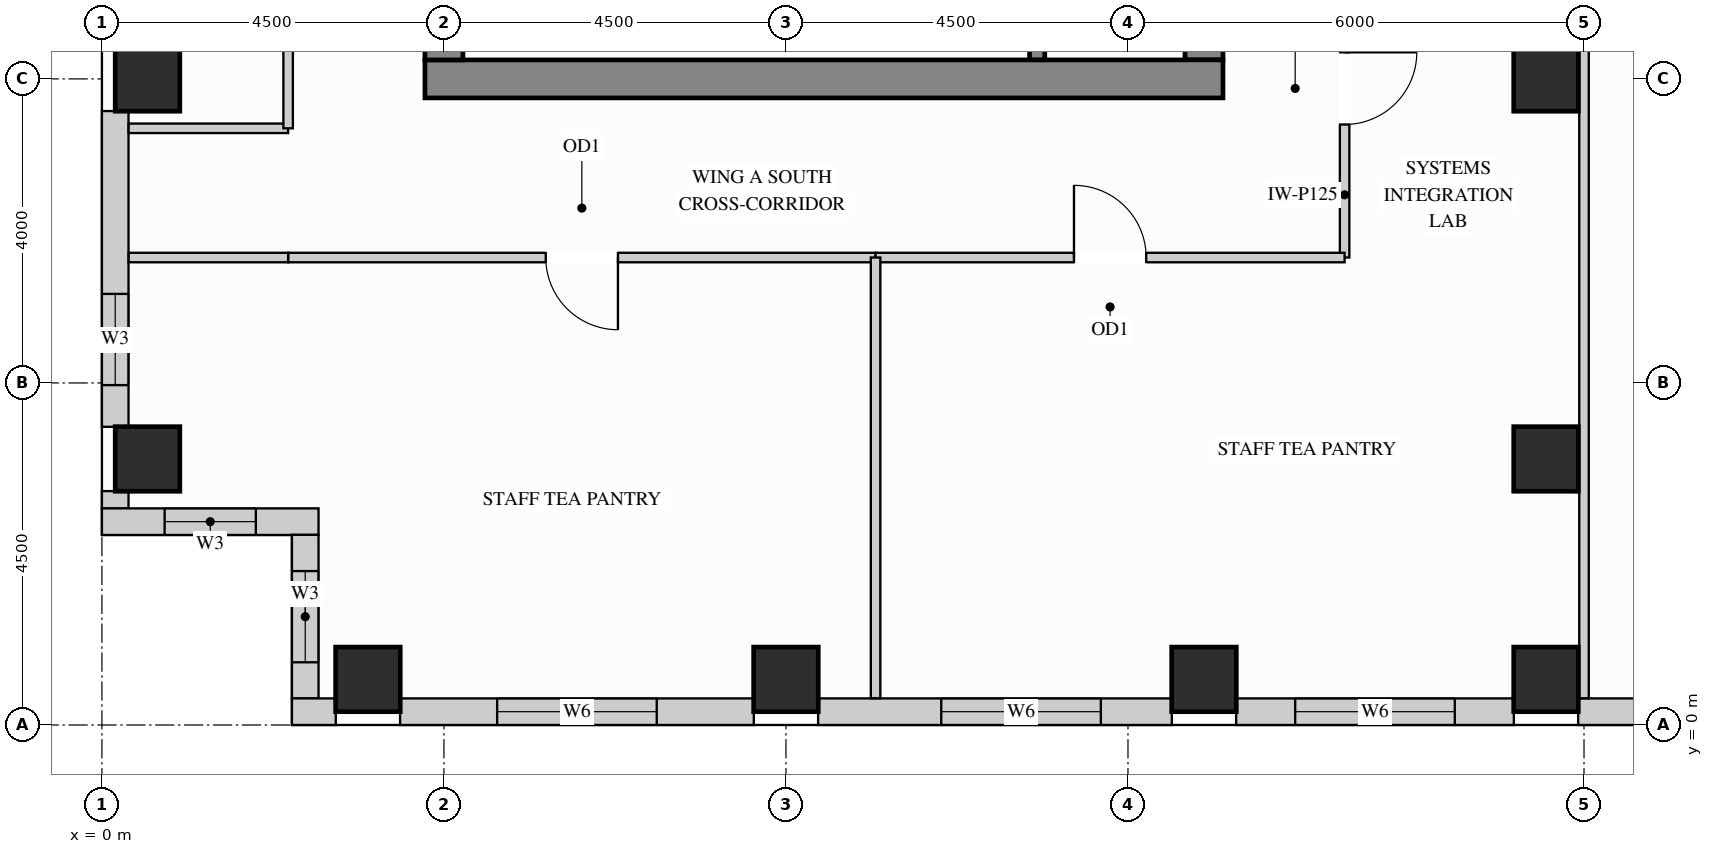
"""IFC4 building model, lengths in metres.
Left out: names, types, materials, properties, quantities, classifications, styles, units other than length and angle.
Written with IfcOpenShell. Run it as: python <this file> out.ifc"""

import sys

from ifc_helpers import new_model, si_unit, direction, frame, frame_2d, origin, origin_2d, place, context, subcontext, project, spatial, rectangle, extrude, source, transform, mapped, element, fill, save


model = new_model("IFC4")
c1 = context("Model", 3, precision=1e-05, world=origin(), true_north=direction((0.0, 1.0)))
c2 = subcontext(c1, "Body", "Model", "MODEL_VIEW")
j1 = project(units=[si_unit("LENGTHUNIT", "METRE"), si_unit("PLANEANGLEUNIT", "RADIAN")], contexts=[c1])
p1 = place(None, origin())
s1 = spatial("IfcSite", under=j1, at=p1, CompositionType="ELEMENT")
p2 = place(p1, origin())
s2 = spatial("IfcBuilding", under=s1, at=p2, CompositionType="ELEMENT")
p3 = place(p2, frame((0.0, 0.0, 273.6)))
s3 = spatial("IfcBuildingStorey", under=s2, at=p3, CompositionType="ELEMENT", Elevation=273.6)
m1 = source(origin(), c2, "Body", "SweptSolid", [
    extrude(rectangle(XDim=0.85, YDim=0.85, at=origin_2d()), origin(), (0.0, 0.0, 1.0), 3.37),
])
for number, where, z_axis, x_axis in (
    (1, (19.0, 3.5, 0.0), (0.0, 0.0, 1.0), (1.0, 0.0, 0.0)),
    (2, (19.0, 8.5, 0.0), (0.0, 0.0, 1.0), (1.0, 0.0, 0.0)),
    (3, (14.5, 0.6, 0.0), (0.0, 0.0, 1.0), (1.0, 0.0, 0.0)),
    (4, (19.0, 0.6, 0.0), (0.0, 0.0, 1.0), (1.0, 0.0, 0.0)),
    (5, (3.5, 0.6, 0.0), (0.0, 0.0, 1.0), (1.0, 0.0, 0.0)),
    (6, (9.0, 0.6, 0.0), (0.0, 0.0, 1.0), (1.0, 0.0, 0.0)),
    (7, (0.6, 3.5, 0.0), (0.0, 0.0, 1.0), (1.0, 0.0, 0.0)),
    (8, (0.6, 8.5, 0.0), (0.0, 0.0, 1.0), (1.0, 0.0, 0.0)),
):
    element("IfcColumn", number, at=place(p3, frame(where, z_axis=z_axis, x_axis=x_axis)), inside=s3, PredefinedType="COLUMN", context=c2, shape_type="MappedRepresentation", body=[
        mapped(m1, transform((0.0, 0.0, 0.0), x_axis=(1.0, 0.0, 0.0), y_axis=(0.0, 1.0, 0.0), z_axis=(0.0, 0.0, 1.0))),
    ])
m2 = source(origin(), c2, "Body", "SweptSolid", [
    extrude(rectangle(XDim=10.07, YDim=0.5, at=frame_2d((5.035, 0.0))), origin(), (0.0, 0.0, 1.0), 3.37),
])
p4 = place(p3, frame((14.5, 8.75, 0.0), z_axis=(0.0, 0.0, 1.0), x_axis=(0.0, 1.0, 0.0)))
e9 = element("IfcWall", 9, at=p4, inside=s3, PredefinedType="SHEAR", context=c2, shape_type="MappedRepresentation", body=[
    mapped(m2, transform((0.0, 0.0, 0.0), x_axis=(1.0, 0.0, 0.0), y_axis=(0.0, 1.0, 0.0), z_axis=(0.0, 0.0, 1.0))),
])
m3 = source(origin(), c2, "Body", "SweptSolid", [
    extrude(rectangle(XDim=10.5, YDim=0.5, at=frame_2d((5.25, 0.0))), origin(), (0.0, 0.0, 1.0), 3.37),
])
p5 = place(p3, frame((4.25, 8.5, 0.0), z_axis=(0.0, 0.0, 1.0), x_axis=(1.0, 0.0, 0.0)))
e10 = element("IfcWall", 10, at=p5, inside=s3, PredefinedType="SHEAR", context=c2, shape_type="MappedRepresentation", body=[
    mapped(m3, transform((0.0, 0.0, 0.0), x_axis=(1.0, 0.0, 0.0), y_axis=(0.0, 1.0, 0.0), z_axis=(0.0, 0.0, 1.0))),
])
m4 = source(origin(), c2, "Body", "SweptSolid", [
    extrude(rectangle(XDim=20.5, YDim=0.5, at=frame_2d((10.25, 0.0))), origin(), (0.0, 0.0, 1.0), 3.37),
])
p6 = place(p3, frame((4.5, 8.75, 0.0), z_axis=(0.0, 0.0, 1.0), x_axis=(0.0, 1.0, 0.0)))
e11 = element("IfcWall", 11, at=p6, inside=s3, PredefinedType="SHEAR", context=c2, shape_type="MappedRepresentation", body=[
    mapped(m4, transform((0.0, 0.0, 0.0), x_axis=(1.0, 0.0, 0.0), y_axis=(0.0, 1.0, 0.0), z_axis=(0.0, 0.0, 1.0))),
])
p7 = place(p3, frame((0.175, 8.077, 0.0), z_axis=(0.0, 0.0, 1.0), x_axis=(0.0, -1.0, 0.0)))
e12 = element("IfcWall", 12, at=p7, inside=s3, PredefinedType="SOLIDWALL", context=c2, shape_type="SweptSolid", body=[
    extrude(rectangle(XDim=4.154, YDim=0.35, at=frame_2d((2.077, 0.0))), origin(), (0.0, 0.0, 1.0), 3.355),
])
p8 = place(p7, frame((2.406, 0.0, 0.78)))
e13 = element("IfcOpeningElement", 13, at=p8, cuts=e12, PredefinedType="OPENING", context=c2, shape_type="SweptSolid", body=[
    extrude(rectangle(XDim=1.2, YDim=2.25, at=frame_2d((0.6, 1.125))), frame((0.0, 0.185, 0.0), z_axis=(0.0, -1.0, 0.0), x_axis=(1.0, 0.0, 0.0)), (0.0, 0.0, 1.0), 0.37),
])
m5 = source(origin(), c2, "Body", "SweptSolid", [
    extrude(rectangle(XDim=0.229, YDim=0.35, at=frame_2d((0.115, 0.0))), origin(), (0.0, 0.0, 1.0), 3.355),
])
p9 = place(p3, frame((0.175, 3.077, 0.0), z_axis=(0.0, 0.0, 1.0), x_axis=(0.0, -1.0, 0.0)))
e14 = element("IfcWall", 14, at=p9, inside=s3, PredefinedType="SOLIDWALL", context=c2, shape_type="MappedRepresentation", body=[
    mapped(m5, transform((0.0, 0.0, 0.0), x_axis=(1.0, 0.0, 0.0), y_axis=(0.0, 1.0, 0.0), z_axis=(0.0, 0.0, 1.0))),
])
p10 = place(p3, frame((0.0, 2.675, 0.0), z_axis=(0.0, 0.0, 1.0), x_axis=(1.0, 0.0, 0.0)))
e15 = element("IfcWall", 15, at=p10, inside=s3, PredefinedType="SOLIDWALL", context=c2, shape_type="SweptSolid", body=[
    extrude(rectangle(XDim=2.85, YDim=0.35, at=frame_2d((1.425, 0.0))), origin(), (0.0, 0.0, 1.0), 3.355),
])
p11 = place(p10, frame((0.825, 0.0, 0.78)))
e16 = element("IfcOpeningElement", 16, at=p11, cuts=e15, PredefinedType="OPENING", context=c2, shape_type="SweptSolid", body=[
    extrude(rectangle(XDim=1.2, YDim=2.25, at=frame_2d((0.6, 1.125))), frame((0.0, 0.185, 0.0), z_axis=(0.0, -1.0, 0.0), x_axis=(1.0, 0.0, 0.0)), (0.0, 0.0, 1.0), 0.37),
])
p12 = place(p3, frame((2.675, 2.502, 0.0), z_axis=(0.0, 0.0, 1.0), x_axis=(0.0, -1.0, 0.0)))
e17 = element("IfcWall", 17, at=p12, inside=s3, PredefinedType="SOLIDWALL", context=c2, shape_type="SweptSolid", body=[
    extrude(rectangle(XDim=2.154, YDim=0.35, at=frame_2d((1.077, 0.0))), origin(), (0.0, 0.0, 1.0), 3.355),
])
p13 = place(p12, frame((0.477, 0.0, 0.78)))
e18 = element("IfcOpeningElement", 18, at=p13, cuts=e17, PredefinedType="OPENING", context=c2, shape_type="SweptSolid", body=[
    extrude(rectangle(XDim=1.2, YDim=2.25, at=frame_2d((0.6, 1.125))), frame((0.0, 0.185, 0.0), z_axis=(0.0, -1.0, 0.0), x_axis=(1.0, 0.0, 0.0)), (0.0, 0.0, 1.0), 0.37),
])
m6 = source(origin(), c2, "Body", "SweptSolid", [
    extrude(rectangle(XDim=0.577, YDim=0.35, at=frame_2d((0.289, 0.0))), origin(), (0.0, 0.0, 1.0), 3.355),
])
p14 = place(p3, frame((2.5, 0.175, 0.0), z_axis=(0.0, 0.0, 1.0), x_axis=(1.0, 0.0, 0.0)))
e19 = element("IfcWall", 19, at=p14, inside=s3, PredefinedType="SOLIDWALL", context=c2, shape_type="MappedRepresentation", body=[
    mapped(m6, transform((0.0, 0.0, 0.0), x_axis=(1.0, 0.0, 0.0), y_axis=(0.0, 1.0, 0.0), z_axis=(0.0, 0.0, 1.0))),
])
p15 = place(p3, frame((3.923, 0.175, 0.0), z_axis=(0.0, 0.0, 1.0), x_axis=(1.0, 0.0, 0.0)))
e20 = element("IfcWall", 20, at=p15, inside=s3, PredefinedType="SOLIDWALL", context=c2, shape_type="SweptSolid", body=[
    extrude(rectangle(XDim=4.654, YDim=0.35, at=frame_2d((2.327, 0.0))), origin(), (0.0, 0.0, 1.0), 3.355),
])
p16 = place(p15, frame((1.277, 0.0, 0.78)))
e21 = element("IfcOpeningElement", 21, at=p16, cuts=e20, PredefinedType="OPENING", context=c2, shape_type="SweptSolid", body=[
    extrude(rectangle(XDim=2.1, YDim=2.25, at=frame_2d((1.05, 1.125))), frame((0.0, 0.185, 0.0), z_axis=(0.0, -1.0, 0.0), x_axis=(1.0, 0.0, 0.0)), (0.0, 0.0, 1.0), 0.37),
])
p17 = place(p3, frame((9.423, 0.175, 0.0), z_axis=(0.0, 0.0, 1.0), x_axis=(1.0, 0.0, 0.0)))
e22 = element("IfcWall", 22, at=p17, inside=s3, PredefinedType="SOLIDWALL", context=c2, shape_type="SweptSolid", body=[
    extrude(rectangle(XDim=4.654, YDim=0.35, at=frame_2d((2.327, 0.0))), origin(), (0.0, 0.0, 1.0), 3.355),
])
p18 = place(p17, frame((1.62, 0.0, 0.78)))
e23 = element("IfcOpeningElement", 23, at=p18, cuts=e22, PredefinedType="OPENING", context=c2, shape_type="SweptSolid", body=[
    extrude(rectangle(XDim=2.1, YDim=2.25, at=frame_2d((1.05, 1.125))), frame((0.0, 0.185, 0.0), z_axis=(0.0, -1.0, 0.0), x_axis=(1.0, 0.0, 0.0)), (0.0, 0.0, 1.0), 0.37),
])
p19 = place(p3, frame((14.923, 0.175, 0.0), z_axis=(0.0, 0.0, 1.0), x_axis=(1.0, 0.0, 0.0)))
e24 = element("IfcWall", 24, at=p19, inside=s3, PredefinedType="SOLIDWALL", context=c2, shape_type="SweptSolid", body=[
    extrude(rectangle(XDim=3.654, YDim=0.35, at=frame_2d((1.827, 0.0))), origin(), (0.0, 0.0, 1.0), 3.355),
])
p20 = place(p19, frame((0.777, 0.0, 0.78)))
e25 = element("IfcOpeningElement", 25, at=p20, cuts=e24, PredefinedType="OPENING", context=c2, shape_type="SweptSolid", body=[
    extrude(rectangle(XDim=2.1, YDim=2.25, at=frame_2d((1.05, 1.125))), frame((0.0, 0.185, 0.0), z_axis=(0.0, -1.0, 0.0), x_axis=(1.0, 0.0, 0.0)), (0.0, 0.0, 1.0), 0.37),
])
p21 = place(p3, frame((19.423, 0.175, 0.0), z_axis=(0.0, 0.0, 1.0), x_axis=(1.0, 0.0, 0.0)))
e26 = element("IfcWall", 26, at=p21, inside=s3, PredefinedType="SOLIDWALL", context=c2, shape_type="SweptSolid", body=[
    extrude(rectangle(XDim=3.554, YDim=0.35, at=frame_2d((1.777, 0.0))), origin(), (0.0, 0.0, 1.0), 3.355),
])
p22 = place(p21, frame((1.031, 0.0, 0.78)))
e27 = element("IfcOpeningElement", 27, at=p22, cuts=e26, PredefinedType="OPENING", context=c2, shape_type="SweptSolid", body=[
    extrude(rectangle(XDim=1.5, YDim=2.0, at=frame_2d((0.75, 1.0))), frame((0.0, 0.185, 0.0), z_axis=(0.0, -1.0, 0.0), x_axis=(1.0, 0.0, 0.0)), (0.0, 0.0, 1.0), 0.37),
])
p23 = place(p3, frame((16.35, 6.15, 0.0), z_axis=(0.0, 0.0, 1.0), x_axis=(0.0, 1.0, 0.0)))
e28 = element("IfcWall", 28, at=p23, inside=s3, PredefinedType="PARTITIONING", context=c2, shape_type="SweptSolid", body=[
    extrude(rectangle(XDim=4.45, YDim=0.125, at=frame_2d((2.225, 0.0))), origin(), (0.0, 0.0, 1.0), 3.355),
])
p24 = place(p23, frame((1.75, 0.0, 0.0)))
e29 = element("IfcOpeningElement", 29, at=p24, cuts=e28, PredefinedType="OPENING", context=c2, shape_type="SweptSolid", body=[
    extrude(rectangle(XDim=0.95, YDim=2.15, at=frame_2d((0.475, 1.075))), frame((0.0, 0.073, 0.0), z_axis=(0.0, -1.0, 0.0), x_axis=(1.0, 0.0, 0.0)), (0.0, 0.0, 1.0), 0.145),
])
m7 = source(origin(), c2, "Body", "SweptSolid", [
    extrude(rectangle(XDim=2.098, YDim=0.125, at=frame_2d((1.049, 0.0))), origin(), (0.0, 0.0, 1.0), 3.355),
])
p25 = place(p3, frame((0.352, 7.85, 0.0), z_axis=(0.0, 0.0, 1.0), x_axis=(1.0, 0.0, 0.0)))
e30 = element("IfcWall", 30, at=p25, inside=s3, PredefinedType="PARTITIONING", context=c2, shape_type="MappedRepresentation", body=[
    mapped(m7, transform((0.0, 0.0, 0.0), x_axis=(1.0, 0.0, 0.0), y_axis=(0.0, 1.0, 0.0), z_axis=(0.0, 0.0, 1.0))),
])
m8 = source(origin(), c2, "Body", "SweptSolid", [
    extrude(rectangle(XDim=10.248, YDim=0.125, at=frame_2d((5.124, 0.0))), origin(), (0.0, 0.0, 1.0), 3.355),
])
p26 = place(p3, frame((19.5, 0.352, 0.0), z_axis=(0.0, 0.0, 1.0), x_axis=(0.0, 1.0, 0.0)))
e31 = element("IfcWall", 31, at=p26, inside=s3, PredefinedType="PARTITIONING", context=c2, shape_type="MappedRepresentation", body=[
    mapped(m8, transform((0.0, 0.0, 0.0), x_axis=(1.0, 0.0, 0.0), y_axis=(0.0, 1.0, 0.0), z_axis=(0.0, 0.0, 1.0))),
])
p27 = place(p3, frame((2.45, 6.15, 0.0), z_axis=(0.0, 0.0, 1.0), x_axis=(1.0, 0.0, 0.0)))
e32 = element("IfcWall", 32, at=p27, inside=s3, PredefinedType="PARTITIONING", context=c2, shape_type="SweptSolid", body=[
    extrude(rectangle(XDim=7.729, YDim=0.125, at=frame_2d((3.865, 0.0))), origin(), (0.0, 0.0, 1.0), 3.355),
])
p28 = place(p27, frame((3.389, 0.0, 0.0)))
e33 = element("IfcOpeningElement", 33, at=p28, cuts=e32, PredefinedType="OPENING", context=c2, shape_type="SweptSolid", body=[
    extrude(rectangle(XDim=0.95, YDim=2.15, at=frame_2d((0.475, 1.075))), frame((0.0, 0.073, 0.0), z_axis=(0.0, -1.0, 0.0), x_axis=(1.0, 0.0, 0.0)), (0.0, 0.0, 1.0), 0.145),
])
p29 = place(p3, frame((10.179, 6.15, 0.0), z_axis=(0.0, 0.0, 1.0), x_axis=(1.0, 0.0, 0.0)))
e34 = element("IfcWall", 34, at=p29, inside=s3, PredefinedType="PARTITIONING", context=c2, shape_type="SweptSolid", body=[
    extrude(rectangle(XDim=6.171, YDim=0.125, at=frame_2d((3.085, 0.0))), origin(), (0.0, 0.0, 1.0), 3.355),
])
p30 = place(p29, frame((2.611, 0.0, 0.0)))
e35 = element("IfcOpeningElement", 35, at=p30, cuts=e34, PredefinedType="OPENING", context=c2, shape_type="SweptSolid", body=[
    extrude(rectangle(XDim=0.95, YDim=2.15, at=frame_2d((0.475, 1.075))), frame((0.0, 0.073, 0.0), z_axis=(0.0, -1.0, 0.0), x_axis=(1.0, 0.0, 0.0)), (0.0, 0.0, 1.0), 0.145),
])
p31 = place(p3, frame((0.352, 6.15, 0.0), z_axis=(0.0, 0.0, 1.0), x_axis=(1.0, 0.0, 0.0)))
e36 = element("IfcWall", 36, at=p31, inside=s3, PredefinedType="PARTITIONING", context=c2, shape_type="MappedRepresentation", body=[
    mapped(m7, transform((0.0, 0.0, 0.0), x_axis=(1.0, 0.0, 0.0), y_axis=(0.0, 1.0, 0.0), z_axis=(0.0, 0.0, 1.0))),
])
m9 = source(origin(), c2, "Body", "SweptSolid", [
    extrude(rectangle(XDim=5.798, YDim=0.125, at=frame_2d((2.899, 0.0))), origin(), (0.0, 0.0, 1.0), 3.355),
])
p32 = place(p3, frame((10.179, 0.352, 0.0), z_axis=(0.0, 0.0, 1.0), x_axis=(0.0, 1.0, 0.0)))
e37 = element("IfcWall", 37, at=p32, inside=s3, PredefinedType="PARTITIONING", context=c2, shape_type="MappedRepresentation", body=[
    mapped(m9, transform((0.0, 0.0, 0.0), x_axis=(1.0, 0.0, 0.0), y_axis=(0.0, 1.0, 0.0), z_axis=(0.0, 0.0, 1.0))),
])
p33 = place(p3, frame((2.45, 7.85, 0.0), z_axis=(0.0, 0.0, 1.0), x_axis=(0.0, 1.0, 0.0)))
e38 = element("IfcWall", 38, at=p33, inside=s3, PredefinedType="PARTITIONING", context=c2, shape_type="SweptSolid", body=[
    extrude(rectangle(XDim=7.25, YDim=0.125, at=frame_2d((3.625, 0.0))), origin(), (0.0, 0.0, 1.0), 3.355),
])
p34 = place(p33, frame((3.15, 0.0, 0.0)))
e39 = element("IfcOpeningElement", 39, at=p34, cuts=e38, PredefinedType="OPENING", context=c2, shape_type="SweptSolid", body=[
    extrude(rectangle(XDim=0.95, YDim=2.15, at=frame_2d((0.475, 1.075))), frame((0.0, 0.073, 0.0), z_axis=(0.0, -1.0, 0.0), x_axis=(1.0, 0.0, 0.0)), (0.0, 0.0, 1.0), 0.145),
])
m10 = source(origin(), c2, "Body", "SweptSolid", [
    extrude(rectangle(XDim=3.803, YDim=0.2, at=frame_2d((1.901, 0.0))), origin(), (0.0, 0.0, 1.0), 3.37),
])
p35 = place(p3, frame((12.305, 8.752, 0.0), z_axis=(0.0, 0.0, 1.0), x_axis=(0.0, 1.0, 0.0)))
e40 = element("IfcWall", 40, at=p35, inside=s3, PredefinedType="SHEAR", context=c2, shape_type="MappedRepresentation", body=[
    mapped(m10, transform((0.0, 0.0, 0.0), x_axis=(1.0, 0.0, 0.0), y_axis=(0.0, 1.0, 0.0), z_axis=(0.0, 0.0, 1.0))),
])
m11 = source(origin(), c2, "Body", "SweptSolid", [
    extrude(rectangle(XDim=0.95, YDim=2.15, at=frame_2d((0.475, 1.075))), frame((0.0, 0.025, 0.0), z_axis=(0.0, -1.0, 0.0), x_axis=(1.0, 0.0, 0.0)), (0.0, 0.0, 1.0), 0.05),
])
p36 = place(p24, origin())
e41 = element("IfcDoor", 41, at=p36, inside=s3, OperationType="SINGLE_SWING_RIGHT", PredefinedType="DOOR", context=c2, shape_type="MappedRepresentation", body=[
    mapped(m11, transform((0.0, 0.0, 0.0), x_axis=(1.0, 0.0, 0.0), y_axis=(0.0, 1.0, 0.0), z_axis=(0.0, 0.0, 1.0))),
])
fill(e29, e41)
p37 = place(p28, origin())
e42 = element("IfcDoor", 42, at=p37, inside=s3, OperationType="SINGLE_SWING_RIGHT", PredefinedType="DOOR", context=c2, shape_type="MappedRepresentation", body=[
    mapped(m11, transform((0.0, 0.0, 0.0), x_axis=(1.0, 0.0, 0.0), y_axis=(0.0, 1.0, 0.0), z_axis=(0.0, 0.0, 1.0))),
])
fill(e33, e42)
p38 = place(p30, origin())
e43 = element("IfcDoor", 43, at=p38, inside=s3, OperationType="SINGLE_SWING_LEFT", PredefinedType="DOOR", context=c2, shape_type="MappedRepresentation", body=[
    mapped(m11, transform((0.0, 0.0, 0.0), x_axis=(1.0, 0.0, 0.0), y_axis=(0.0, 1.0, 0.0), z_axis=(0.0, 0.0, 1.0))),
])
fill(e35, e43)
m12 = source(origin(), c2, "Body", "SweptSolid", [
    extrude(rectangle(XDim=1.2, YDim=2.25, at=frame_2d((0.6, 1.125))), frame((0.0, 0.03, 0.0), z_axis=(0.0, -1.0, 0.0), x_axis=(1.0, 0.0, 0.0)), (0.0, 0.0, 1.0), 0.06),
])
p39 = place(p8, origin())
e44 = element("IfcWindow", 44, at=p39, inside=s3, PartitioningType="SINGLE_PANEL", PredefinedType="WINDOW", context=c2, shape_type="MappedRepresentation", body=[
    mapped(m12, transform((0.0, 0.0, 0.0), x_axis=(1.0, 0.0, 0.0), y_axis=(0.0, 1.0, 0.0), z_axis=(0.0, 0.0, 1.0))),
])
fill(e13, e44)
p40 = place(p11, origin())
e45 = element("IfcWindow", 45, at=p40, inside=s3, PartitioningType="SINGLE_PANEL", PredefinedType="WINDOW", context=c2, shape_type="MappedRepresentation", body=[
    mapped(m12, transform((0.0, 0.0, 0.0), x_axis=(1.0, 0.0, 0.0), y_axis=(0.0, 1.0, 0.0), z_axis=(0.0, 0.0, 1.0))),
])
fill(e16, e45)
p41 = place(p13, origin())
e46 = element("IfcWindow", 46, at=p41, inside=s3, PartitioningType="SINGLE_PANEL", PredefinedType="WINDOW", context=c2, shape_type="MappedRepresentation", body=[
    mapped(m12, transform((0.0, 0.0, 0.0), x_axis=(1.0, 0.0, 0.0), y_axis=(0.0, 1.0, 0.0), z_axis=(0.0, 0.0, 1.0))),
])
fill(e18, e46)
m13 = source(origin(), c2, "Body", "SweptSolid", [
    extrude(rectangle(XDim=2.1, YDim=2.25, at=frame_2d((1.05, 1.125))), frame((0.0, 0.03, 0.0), z_axis=(0.0, -1.0, 0.0), x_axis=(1.0, 0.0, 0.0)), (0.0, 0.0, 1.0), 0.06),
])
p42 = place(p16, origin())
e47 = element("IfcWindow", 47, at=p42, inside=s3, PartitioningType="SINGLE_PANEL", PredefinedType="WINDOW", context=c2, shape_type="MappedRepresentation", body=[
    mapped(m13, transform((0.0, 0.0, 0.0), x_axis=(1.0, 0.0, 0.0), y_axis=(0.0, 1.0, 0.0), z_axis=(0.0, 0.0, 1.0))),
])
fill(e21, e47)
p43 = place(p18, origin())
e48 = element("IfcWindow", 48, at=p43, inside=s3, PartitioningType="SINGLE_PANEL", PredefinedType="WINDOW", context=c2, shape_type="MappedRepresentation", body=[
    mapped(m13, transform((0.0, 0.0, 0.0), x_axis=(1.0, 0.0, 0.0), y_axis=(0.0, 1.0, 0.0), z_axis=(0.0, 0.0, 1.0))),
])
fill(e23, e48)
p44 = place(p20, origin())
e49 = element("IfcWindow", 49, at=p44, inside=s3, PartitioningType="SINGLE_PANEL", PredefinedType="WINDOW", context=c2, shape_type="MappedRepresentation", body=[
    mapped(m13, transform((0.0, 0.0, 0.0), x_axis=(1.0, 0.0, 0.0), y_axis=(0.0, 1.0, 0.0), z_axis=(0.0, 0.0, 1.0))),
])
fill(e25, e49)
save(model, sys.argv[1])
